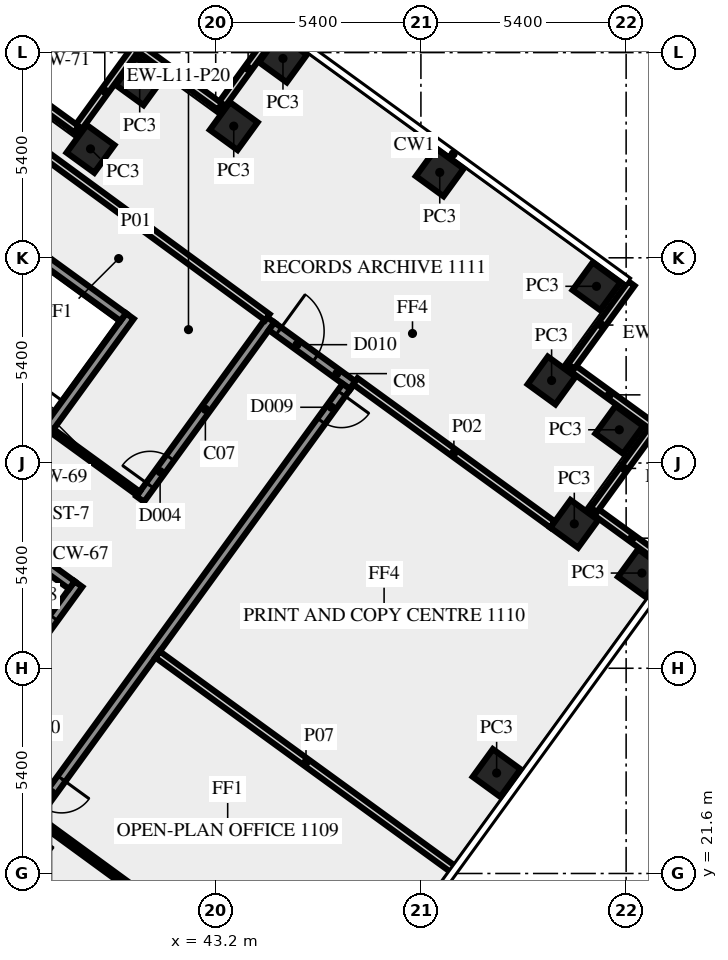
"""IFC4 building model, lengths in metres.
Left out: names, types, materials, properties, quantities, classifications, styles, units other than length and angle.
Written with IfcOpenShell. Run it as: python <this file> out.ifc"""

import sys

from ifc_helpers import new_model, si_unit, direction, frame, frame_2d, origin, origin_2d, place, context, subcontext, project, spatial, rectangle, extrude, element, fill, save


model = new_model("IFC4")
c1 = context("Model", 3, precision=1e-05, world=origin(), true_north=direction((0.0, 1.0)))
c2 = subcontext(c1, "Body", "Model", "MODEL_VIEW")
j1 = project(units=[si_unit("LENGTHUNIT", "METRE"), si_unit("PLANEANGLEUNIT", "RADIAN")], contexts=[c1])
p1 = place(None, origin())
s1 = spatial("IfcSite", under=j1, at=p1, CompositionType="ELEMENT")
p2 = place(p1, origin())
s2 = spatial("IfcBuilding", under=s1, at=p2, CompositionType="ELEMENT")
p3 = place(p2, frame((0.0, 0.0, 51.0)))
s3 = spatial("IfcBuildingStorey", under=s2, at=p3, CompositionType="ELEMENT", Elevation=51.0)
for number, where, z_axis, x_axis in (
    (1, (50.592, 24.243, 0.0), (0.0, 0.0, 1.0), (0.588, 0.809, 0.0)),
    (2, (54.415, 29.505, 0.0), (0.0, 0.0, 1.0), (0.588, 0.809, 0.0)),
    (3, (52.636, 30.8, 0.0), (0.0, 0.0, 1.0), (-0.809, 0.588, 0.0)),
    (4, (53.82, 33.275, 0.0), (0.0, 0.0, 1.0), (-0.809, 0.588, 0.0)),
    (5, (52.039, 34.571, 0.0), (0.0, 0.0, 1.0), (0.588, 0.809, 0.0)),
    (6, (53.22, 37.05, 0.0), (0.0, 0.0, 1.0), (-0.809, 0.588, 0.0)),
    (7, (49.096, 40.047, 0.0), (0.0, 0.0, 1.0), (-0.809, 0.588, 0.0)),
    (8, (44.97, 43.045, 0.0), (0.0, 0.0, 1.0), (-0.809, 0.588, 0.0)),
    (9, (43.675, 41.265, 0.0), (0.0, 0.0, 1.0), (-0.809, 0.588, 0.0)),
    (10, (41.2, 42.445, 0.0), (0.0, 0.0, 1.0), (-0.588, -0.809, 0.0)),
    (11, (39.906, 40.666, 0.0), (0.0, 0.0, 1.0), (-0.588, -0.809, 0.0)),
):
    element("IfcColumn", number, at=place(p3, frame(where, z_axis=z_axis, x_axis=x_axis)), inside=s3, PredefinedType="COLUMN", context=c2, shape_type="SweptSolid", body=[
        extrude(rectangle(XDim=0.9, YDim=0.9, at=origin_2d()), origin(), (0.0, 0.0, 1.0), 3.65),
    ])
p4 = place(p3, frame((55.247, 29.629, 0.0), z_axis=(0.0, 0.0, 1.0), x_axis=(-0.809033161865, 0.587762999008, 0.0)))
e12 = element("IfcWall", 12, at=p4, inside=s3, PredefinedType="SOLIDWALL", context=c2, shape_type="SweptSolid", body=[
    extrude(rectangle(XDim=2.7, YDim=0.2, at=frame_2d((1.35, 0.0))), origin(), (0.0, 0.0, 1.0), 3.65),
])
p5 = place(p3, frame((53.151, 31.167, 0.0), z_axis=(0.0, 0.0, 1.0), x_axis=(0.587779184282, 0.809021403008, 0.0)))
e13 = element("IfcWall", 13, at=p5, inside=s3, PredefinedType="SOLIDWALL", context=c2, shape_type="SweptSolid", body=[
    extrude(rectangle(XDim=2.7, YDim=0.2, at=frame_2d((1.35, 0.0))), origin(), (0.0, 0.0, 1.0), 3.65),
])
for number, where, z_axis, x_axis in (
    (14, (54.65, 33.4, 0.0), (0.0, 0.0, 1.0), (-0.809, 0.588, 0.0)),
    (15, (52.553, 34.938, 0.0), (0.0, 0.0, 1.0), (0.588, 0.809, 0.0)),
    (16, (44.846, 43.875, 0.0), (0.0, 0.0, 1.0), (-0.588, -0.809, 0.0)),
    (17, (43.308, 41.779, 0.0), (0.0, 0.0, 1.0), (-0.809, 0.588, 0.0)),
):
    element("IfcWall", number, at=place(p3, frame(where, z_axis=z_axis, x_axis=x_axis)), inside=s3, PredefinedType="SOLIDWALL", context=c2, shape_type="SweptSolid", body=[
        extrude(rectangle(XDim=2.7, YDim=0.2, at=frame_2d((1.35, 0.0))), origin(), (0.0, 0.0, 1.0), 3.65),
    ])
p6 = place(p3, frame((41.075, 43.278, 0.0), z_axis=(0.0, 0.0, 1.0), x_axis=(-0.587806000234, -0.809001919707, 0.0)))
e18 = element("IfcWall", 18, at=p6, inside=s3, PredefinedType="SOLIDWALL", context=c2, shape_type="SweptSolid", body=[
    extrude(rectangle(XDim=2.7, YDim=0.2, at=frame_2d((1.35, 0.0))), origin(), (0.0, 0.0, 1.0), 3.65),
])
p7 = place(p3, frame((39.537, 41.181, 0.0), z_axis=(0.0, 0.0, 1.0), x_axis=(-0.809033161865, 0.587762999008, 0.0)))
e19 = element("IfcWall", 19, at=p7, inside=s3, PredefinedType="SOLIDWALL", context=c2, shape_type="SweptSolid", body=[
    extrude(rectangle(XDim=2.7, YDim=0.2, at=frame_2d((1.35, 0.0))), origin(), (0.0, 0.0, 1.0), 3.65),
])
p8 = place(p3, frame((37.238, 25.98, 0.0), z_axis=(0.0, 0.0, 1.0), x_axis=(0.587772420479, 0.809026317077, 0.0)))
e20 = element("IfcWall", 20, at=p8, inside=s3, PredefinedType="SHEAR", context=c2, shape_type="SweptSolid", body=[
    extrude(rectangle(XDim=4.0, YDim=0.25, at=frame_2d((2.0, 0.0))), origin(), (0.0, 0.0, 1.0), 3.65),
])
p9 = place(p8, frame((1.1, 0.0, 0.0)))
e21 = element("IfcOpeningElement", 21, at=p9, cuts=e20, PredefinedType="OPENING", context=c2, shape_type="SweptSolid", body=[
    extrude(rectangle(XDim=1.8, YDim=2.1, at=frame_2d((0.9, 1.05))), frame((0.0, 0.135, 0.0), z_axis=(0.0, -1.0, 0.0), x_axis=(1.0, 0.0, 0.0)), (0.0, 0.0, 1.0), 0.27),
])
p10 = place(p3, frame((39.414, 29.188, 0.0), z_axis=(0.0, 0.0, 1.0), x_axis=(-0.808969789945, 0.58785021813, 0.0)))
e22 = element("IfcWall", 22, at=p10, inside=s3, PredefinedType="SHEAR", context=c2, shape_type="SweptSolid", body=[
    extrude(rectangle(XDim=2.8, YDim=0.25, at=frame_2d((1.4, 0.0))), origin(), (0.0, 0.0, 1.0), 3.65),
])
p11 = place(p3, frame((34.77, 27.772, 0.0), z_axis=(0.0, 0.0, 1.0), x_axis=(0.587795589702, 0.809009483706, 0.0)))
e23 = element("IfcWall", 23, at=p11, inside=s3, PredefinedType="SHEAR", context=c2, shape_type="SweptSolid", body=[
    extrude(rectangle(XDim=10.5, YDim=0.25, at=frame_2d((5.25, 0.0))), origin(), (0.0, 0.0, 1.0), 3.65),
])
p12 = place(p11, frame((0.45, 0.0, 0.0)))
e24 = element("IfcOpeningElement", 24, at=p12, cuts=e23, PredefinedType="OPENING", context=c2, shape_type="SweptSolid", body=[
    extrude(rectangle(XDim=1.8, YDim=2.1, at=frame_2d((0.9, 1.05))), frame((0.0, 0.135, 0.0), z_axis=(0.0, -1.0, 0.0), x_axis=(1.0, 0.0, 0.0)), (0.0, 0.0, 1.0), 0.27),
])
p13 = place(p3, frame((40.767, 36.24, 0.0), z_axis=(0.0, 0.0, 1.0), x_axis=(-0.809020161303, 0.587780893365, 0.0)))
e25 = element("IfcWall", 25, at=p13, inside=s3, PredefinedType="SHEAR", context=c2, shape_type="SweptSolid", body=[
    extrude(rectangle(XDim=5.35, YDim=0.25, at=frame_2d((2.675, 0.0))), origin(), (0.0, 0.0, 1.0), 3.65),
])
p14 = place(p3, frame((41.213, 31.451, 0.0), z_axis=(0.0, 0.0, 1.0), x_axis=(0.587783636081, 0.809018168619, 0.0)))
e26 = element("IfcWall", 26, at=p14, inside=s3, PredefinedType="SOLIDWALL", context=c2, shape_type="SweptSolid", body=[
    extrude(rectangle(XDim=5.837, YDim=0.25, at=frame_2d((2.918, 0.0))), origin(), (0.0, 0.0, 1.0), 3.65),
])
p15 = place(p14, frame((0.441, 0.0, 0.0)))
e27 = element("IfcOpeningElement", 27, at=p15, cuts=e26, PredefinedType="OPENING", context=c2, shape_type="SweptSolid", body=[
    extrude(rectangle(XDim=0.9, YDim=2.1, at=frame_2d((0.45, 1.05))), frame((0.0, 0.135, 0.0), z_axis=(0.0, -1.0, 0.0), x_axis=(1.0, 0.0, 0.0)), (0.0, 0.0, 1.0), 0.27),
])
p16 = place(p3, frame((44.671, 35.999, 0.0), z_axis=(0.0, 0.0, 1.0), x_axis=(0.809006914995, -0.587799125119, 0.0)))
e28 = element("IfcWall", 28, at=p16, inside=s3, PredefinedType="SOLIDWALL", context=c2, shape_type="SweptSolid", body=[
    extrude(rectangle(XDim=2.65, YDim=0.25, at=frame_2d((1.325, 0.0))), origin(), (0.0, 0.0, 1.0), 3.65),
])
p17 = place(p16, frame((0.225, 0.0, 0.0)))
e29 = element("IfcOpeningElement", 29, at=p17, cuts=e28, PredefinedType="OPENING", context=c2, shape_type="SweptSolid", body=[
    extrude(rectangle(XDim=1.2, YDim=2.1, at=frame_2d((0.6, 1.05))), frame((0.0, 0.135, 0.0), z_axis=(0.0, -1.0, 0.0), x_axis=(1.0, 0.0, 0.0)), (0.0, 0.0, 1.0), 0.27),
])
p18 = place(p3, frame((46.641, 34.413, 0.0), z_axis=(0.0, 0.0, 1.0), x_axis=(-0.587785682186, -0.809016682039, 0.0)))
e30 = element("IfcWall", 30, at=p18, inside=s3, PredefinedType="SOLIDWALL", context=c2, shape_type="SweptSolid", body=[
    extrude(rectangle(XDim=44.42, YDim=0.25, at=frame_2d((22.21, 0.0))), origin(), (0.0, 0.0, 1.0), 3.65),
])
p19 = place(p18, frame((12.755, 0.0, 0.0)))
e31 = element("IfcOpeningElement", 31, at=p19, cuts=e30, PredefinedType="OPENING", context=c2, shape_type="SweptSolid", body=[
    extrude(rectangle(XDim=0.9, YDim=2.1, at=frame_2d((0.45, 1.05))), frame((0.0, 0.135, 0.0), z_axis=(0.0, -1.0, 0.0), x_axis=(1.0, 0.0, 0.0)), (0.0, 0.0, 1.0), 0.27),
])
p20 = place(p18, frame((29.205, 0.0, 0.0)))
e32 = element("IfcOpeningElement", 32, at=p20, cuts=e30, PredefinedType="OPENING", context=c2, shape_type="SweptSolid", body=[
    extrude(rectangle(XDim=0.9, YDim=2.1, at=frame_2d((0.45, 1.05))), frame((0.0, 0.135, 0.0), z_axis=(0.0, -1.0, 0.0), x_axis=(1.0, 0.0, 0.0)), (0.0, 0.0, 1.0), 0.27),
])
p21 = place(p18, frame((14.354, 0.0, 0.0)))
e33 = element("IfcOpeningElement", 33, at=p21, cuts=e30, PredefinedType="OPENING", context=c2, shape_type="SweptSolid", body=[
    extrude(rectangle(XDim=0.9, YDim=2.1, at=frame_2d((0.45, 1.05))), frame((0.0, 0.135, 0.0), z_axis=(0.0, -1.0, 0.0), x_axis=(1.0, 0.0, 0.0)), (0.0, 0.0, 1.0), 0.27),
])
p22 = place(p18, frame((27.604, 0.0, 0.0)))
e34 = element("IfcOpeningElement", 34, at=p22, cuts=e30, PredefinedType="OPENING", context=c2, shape_type="SweptSolid", body=[
    extrude(rectangle(XDim=0.9, YDim=2.1, at=frame_2d((0.45, 1.05))), frame((0.0, 0.135, 0.0), z_axis=(0.0, -1.0, 0.0), x_axis=(1.0, 0.0, 0.0)), (0.0, 0.0, 1.0), 0.27),
])
p23 = place(p18, frame((0.225, 0.0, 0.0)))
e35 = element("IfcOpeningElement", 35, at=p23, cuts=e30, PredefinedType="OPENING", context=c2, shape_type="SweptSolid", body=[
    extrude(rectangle(XDim=0.9, YDim=2.1, at=frame_2d((0.45, 1.05))), frame((0.0, 0.135, 0.0), z_axis=(0.0, -1.0, 0.0), x_axis=(1.0, 0.0, 0.0)), (0.0, 0.0, 1.0), 0.27),
])
p24 = place(p3, frame((37.643, 41.297, 0.0), z_axis=(0.0, 0.0, 1.0), x_axis=(0.806949857155, -0.590619952286, 0.0)))
e36 = element("IfcWall", 36, at=p24, inside=s3, PredefinedType="SOLIDWALL", context=c2, shape_type="SweptSolid", body=[
    extrude(rectangle(XDim=8.57, YDim=0.2, at=frame_2d((4.285, 0.0))), origin(), (0.0, 0.0, 1.0), 3.65),
])
p25 = place(p3, frame((46.873, 34.554, 0.0), z_axis=(0.0, 0.0, 1.0), x_axis=(0.808992766665, -0.58781859743, 0.0)))
e37 = element("IfcWall", 37, at=p25, inside=s3, PredefinedType="SOLIDWALL", context=c2, shape_type="SweptSolid", body=[
    extrude(rectangle(XDim=6.414, YDim=0.2, at=frame_2d((3.207, 0.0))), origin(), (0.0, 0.0, 1.0), 3.65),
])
p26 = place(p3, frame((38.522, 23.026, 0.0), z_axis=(0.0, 0.0, 1.0), x_axis=(0.807606997933, -0.589721067023, 0.0)))
e38 = element("IfcWall", 38, at=p26, inside=s3, PredefinedType="PARTITIONING", context=c2, shape_type="SweptSolid", body=[
    extrude(rectangle(XDim=9.55, YDim=0.15, at=frame_2d((4.775, 0.0))), origin(), (0.0, 0.0, 1.0), 2.75),
])
p27 = place(p3, frame((49.48, 21.69, 0.0), z_axis=(0.0, 0.0, 1.0), x_axis=(-0.808999631097, 0.587809150052, 0.0)))
e39 = element("IfcWall", 39, at=p27, inside=s3, PredefinedType="SOLIDWALL", context=c2, shape_type="SweptSolid", body=[
    extrude(rectangle(XDim=9.651, YDim=0.2, at=frame_2d((4.826, 0.0))), origin(), (0.0, 0.0, 1.0), 2.75),
])
p28 = place(p3, frame((38.9, 33.245, 0.0), z_axis=(0.0, 0.0, 1.0), x_axis=(0.809090262332, -0.587684394381, 0.0)))
e40 = element("IfcWall", 40, at=p28, inside=s3, PredefinedType="PARTITIONING", context=c2, shape_type="SweptSolid", body=[
    extrude(rectangle(XDim=2.801, YDim=0.12, at=frame_2d((1.4, 0.0))), origin(), (0.0, 0.0, 1.0), 3.65),
])
p29 = place(p9, origin())
e41 = element("IfcDoor", 41, at=p29, inside=s3, OperationType="DOUBLE_DOOR_SINGLE_SWING", PredefinedType="DOOR", context=c2, shape_type="SweptSolid", body=[
    extrude(rectangle(XDim=1.8, YDim=2.1, at=frame_2d((0.9, 1.05))), frame((0.0, 0.025, 0.0), z_axis=(0.0, -1.0, 0.0), x_axis=(1.0, 0.0, 0.0)), (0.0, 0.0, 1.0), 0.05),
])
fill(e21, e41)
p30 = place(p17, origin())
e42 = element("IfcDoor", 42, at=p30, inside=s3, OperationType="SINGLE_SWING_LEFT", PredefinedType="DOOR", context=c2, shape_type="SweptSolid", body=[
    extrude(rectangle(XDim=1.2, YDim=2.1, at=frame_2d((0.6, 1.05))), frame((0.0, 0.025, 0.0), z_axis=(0.0, -1.0, 0.0), x_axis=(1.0, 0.0, 0.0)), (0.0, 0.0, 1.0), 0.05),
])
fill(e29, e42)
p31 = place(p15, origin())
e43 = element("IfcDoor", 43, at=p31, inside=s3, OperationType="SINGLE_SWING_LEFT", PredefinedType="DOOR", context=c2, shape_type="SweptSolid", body=[
    extrude(rectangle(XDim=0.9, YDim=2.1, at=frame_2d((0.45, 1.05))), frame((0.0, 0.025, 0.0), z_axis=(0.0, -1.0, 0.0), x_axis=(1.0, 0.0, 0.0)), (0.0, 0.0, 1.0), 0.05),
])
fill(e27, e43)
p32 = place(p19, origin())
e44 = element("IfcDoor", 44, at=p32, inside=s3, OperationType="SINGLE_SWING_RIGHT", PredefinedType="DOOR", context=c2, shape_type="SweptSolid", body=[
    extrude(rectangle(XDim=0.9, YDim=2.1, at=frame_2d((0.45, 1.05))), frame((0.0, 0.025, 0.0), z_axis=(0.0, -1.0, 0.0), x_axis=(1.0, 0.0, 0.0)), (0.0, 0.0, 1.0), 0.05),
])
fill(e31, e44)
p33 = place(p23, origin())
e45 = element("IfcDoor", 45, at=p33, inside=s3, OperationType="SINGLE_SWING_LEFT", PredefinedType="DOOR", context=c2, shape_type="SweptSolid", body=[
    extrude(rectangle(XDim=0.9, YDim=2.1, at=frame_2d((0.45, 1.05))), frame((0.0, 0.025, 0.0), z_axis=(0.0, -1.0, 0.0), x_axis=(1.0, 0.0, 0.0)), (0.0, 0.0, 1.0), 0.05),
])
fill(e35, e45)
save(model, sys.argv[1])
